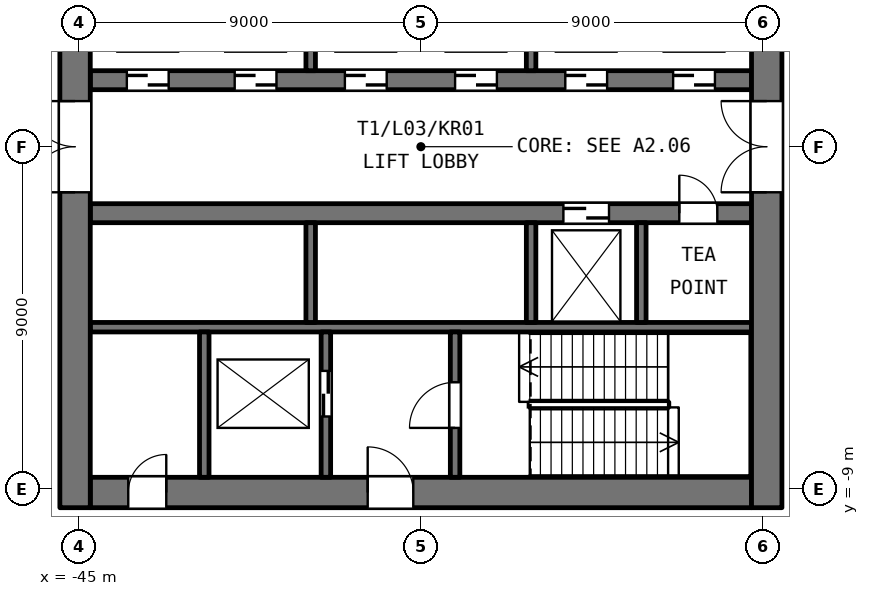
"""IFC4 building model, lengths in metres.
Left out: names, types, materials, properties, quantities, classifications, styles, units other than length and angle.
Written with IfcOpenShell. Run it as: python <this file> out.ifc"""

import sys

from ifc_helpers import new_model, si_unit, direction, frame, frame_2d, origin, place, context, subcontext, project, spatial, rectangle, extrude, element, fill, save


model = new_model("IFC4")
c1 = context("Model", 3, precision=1e-05, world=origin(), true_north=direction((0.0, 1.0)))
c2 = subcontext(c1, "Body", "Model", "MODEL_VIEW")
j1 = project(units=[si_unit("LENGTHUNIT", "METRE"), si_unit("PLANEANGLEUNIT", "RADIAN")], contexts=[c1])
p1 = place(None, origin())
s1 = spatial("IfcSite", under=j1, at=p1, CompositionType="ELEMENT")
p2 = place(p1, origin())
s2 = spatial("IfcBuilding", under=s1, at=p2, CompositionType="ELEMENT")
p3 = place(p2, frame((0.0, 0.0, 18.0)))
s3 = spatial("IfcBuildingStorey", under=s2, at=p3, CompositionType="ELEMENT", Elevation=18.0)
p4 = place(p3, frame((-44.7, -9.1, 0.0), z_axis=(0.0, 0.0, 1.0), x_axis=(1.0, 0.0, 0.0)))
e1 = element("IfcWall", 1, at=p4, inside=s3, PredefinedType="SHEAR", context=c2, shape_type="SweptSolid", body=[
    extrude(rectangle(XDim=17.4, YDim=0.8, at=frame_2d((8.7, 0.0))), origin(), (0.0, 0.0, 1.0), 4.5),
])
p5 = place(p4, frame((7.3, 0.0, 0.0)))
e2 = element("IfcOpeningElement", 2, at=p5, cuts=e1, PredefinedType="OPENING", context=c2, shape_type="SweptSolid", body=[
    extrude(rectangle(XDim=1.2, YDim=2.1, at=frame_2d((0.6, 1.05))), frame((0.0, 0.41, 0.0), z_axis=(0.0, -1.0, 0.0), x_axis=(1.0, 0.0, 0.0)), (0.0, 0.0, 1.0), 0.82),
])
p6 = place(p4, frame((1.0, 0.0, 0.0)))
e3 = element("IfcOpeningElement", 3, at=p6, cuts=e1, PredefinedType="OPENING", context=c2, shape_type="SweptSolid", body=[
    extrude(rectangle(XDim=1.0, YDim=2.1, at=frame_2d((0.5, 1.05))), frame((0.0, 0.41, 0.0), z_axis=(0.0, -1.0, 0.0), x_axis=(1.0, 0.0, 0.0)), (0.0, 0.0, 1.0), 0.82),
])
p7 = place(p3, frame((-44.7, -4.75, 0.0), z_axis=(0.0, 0.0, 1.0), x_axis=(1.0, 0.0, 0.0)))
e4 = element("IfcWall", 4, at=p7, inside=s3, PredefinedType="SHEAR", context=c2, shape_type="SweptSolid", body=[
    extrude(rectangle(XDim=17.4, YDim=0.25, at=frame_2d((8.7, 0.0))), origin(), (0.0, 0.0, 1.0), 4.5),
])
p8 = place(p3, frame((-44.7, -1.75, 0.0), z_axis=(0.0, 0.0, 1.0), x_axis=(1.0, 0.0, 0.0)))
e5 = element("IfcWall", 5, at=p8, inside=s3, PredefinedType="SHEAR", context=c2, shape_type="SweptSolid", body=[
    extrude(rectangle(XDim=17.4, YDim=0.5, at=frame_2d((8.7, 0.0))), origin(), (0.0, 0.0, 1.0), 4.5),
])
p9 = place(p8, frame((12.45, 0.0, 0.0)))
e6 = element("IfcOpeningElement", 6, at=p9, cuts=e5, PredefinedType="OPENING", context=c2, shape_type="SweptSolid", body=[
    extrude(rectangle(XDim=1.2, YDim=2.1, at=frame_2d((0.6, 1.05))), frame((0.0, 0.26, 0.0), z_axis=(0.0, -1.0, 0.0), x_axis=(1.0, 0.0, 0.0)), (0.0, 0.0, 1.0), 0.52),
])
p10 = place(p8, frame((15.5, 0.0, 0.0)))
e7 = element("IfcOpeningElement", 7, at=p10, cuts=e5, PredefinedType="OPENING", context=c2, shape_type="SweptSolid", body=[
    extrude(rectangle(XDim=1.0, YDim=2.1, at=frame_2d((0.5, 1.05))), frame((0.0, 0.26, 0.0), z_axis=(0.0, -1.0, 0.0), x_axis=(1.0, 0.0, 0.0)), (0.0, 0.0, 1.0), 0.52),
])
p11 = place(p3, frame((-44.7, 1.75, 0.0), z_axis=(0.0, 0.0, 1.0), x_axis=(1.0, 0.0, 0.0)))
e8 = element("IfcWall", 8, at=p11, inside=s3, PredefinedType="SHEAR", context=c2, shape_type="SweptSolid", body=[
    extrude(rectangle(XDim=17.4, YDim=0.5, at=frame_2d((8.7, 0.0))), origin(), (0.0, 0.0, 1.0), 4.5),
])
p12 = place(p11, frame((0.962, 0.0, 0.0)))
e9 = element("IfcOpeningElement", 9, at=p12, cuts=e8, PredefinedType="OPENING", context=c2, shape_type="SweptSolid", body=[
    extrude(rectangle(XDim=1.1, YDim=2.1, at=frame_2d((0.55, 1.05))), frame((0.0, 0.26, 0.0), z_axis=(0.0, -1.0, 0.0), x_axis=(1.0, 0.0, 0.0)), (0.0, 0.0, 1.0), 0.52),
])
p13 = place(p11, frame((3.8, 0.0, 0.0)))
e10 = element("IfcOpeningElement", 10, at=p13, cuts=e8, PredefinedType="OPENING", context=c2, shape_type="SweptSolid", body=[
    extrude(rectangle(XDim=1.1, YDim=2.1, at=frame_2d((0.55, 1.05))), frame((0.0, 0.26, 0.0), z_axis=(0.0, -1.0, 0.0), x_axis=(1.0, 0.0, 0.0)), (0.0, 0.0, 1.0), 0.52),
])
p14 = place(p11, frame((6.7, 0.0, 0.0)))
e11 = element("IfcOpeningElement", 11, at=p14, cuts=e8, PredefinedType="OPENING", context=c2, shape_type="SweptSolid", body=[
    extrude(rectangle(XDim=1.1, YDim=2.1, at=frame_2d((0.55, 1.05))), frame((0.0, 0.26, 0.0), z_axis=(0.0, -1.0, 0.0), x_axis=(1.0, 0.0, 0.0)), (0.0, 0.0, 1.0), 0.52),
])
p15 = place(p11, frame((9.6, 0.0, 0.0)))
e12 = element("IfcOpeningElement", 12, at=p15, cuts=e8, PredefinedType="OPENING", context=c2, shape_type="SweptSolid", body=[
    extrude(rectangle(XDim=1.1, YDim=2.1, at=frame_2d((0.55, 1.05))), frame((0.0, 0.26, 0.0), z_axis=(0.0, -1.0, 0.0), x_axis=(1.0, 0.0, 0.0)), (0.0, 0.0, 1.0), 0.52),
])
p16 = place(p11, frame((12.5, 0.0, 0.0)))
e13 = element("IfcOpeningElement", 13, at=p16, cuts=e8, PredefinedType="OPENING", context=c2, shape_type="SweptSolid", body=[
    extrude(rectangle(XDim=1.1, YDim=2.1, at=frame_2d((0.55, 1.05))), frame((0.0, 0.26, 0.0), z_axis=(0.0, -1.0, 0.0), x_axis=(1.0, 0.0, 0.0)), (0.0, 0.0, 1.0), 0.52),
])
p17 = place(p11, frame((15.337, 0.0, 0.0)))
e14 = element("IfcOpeningElement", 14, at=p17, cuts=e8, PredefinedType="OPENING", context=c2, shape_type="SweptSolid", body=[
    extrude(rectangle(XDim=1.1, YDim=2.1, at=frame_2d((0.55, 1.05))), frame((0.0, 0.26, 0.0), z_axis=(0.0, -1.0, 0.0), x_axis=(1.0, 0.0, 0.0)), (0.0, 0.0, 1.0), 0.52),
])
p18 = place(p3, frame((-45.1, -9.5, 0.0), z_axis=(0.0, 0.0, 1.0), x_axis=(0.0, 1.0, 0.0)))
e15 = element("IfcWall", 15, at=p18, inside=s3, PredefinedType="SHEAR", context=c2, shape_type="SweptSolid", body=[
    extrude(rectangle(XDim=19.0, YDim=0.8, at=frame_2d((9.5, 0.0))), origin(), (0.0, 0.0, 1.0), 4.5),
])
p19 = place(p18, frame((8.3, 0.0, 0.0)))
e16 = element("IfcOpeningElement", 16, at=p19, cuts=e15, PredefinedType="OPENING", context=c2, shape_type="SweptSolid", body=[
    extrude(rectangle(XDim=2.4, YDim=2.1, at=frame_2d((1.2, 1.05))), frame((0.0, 0.41, 0.0), z_axis=(0.0, -1.0, 0.0), x_axis=(1.0, 0.0, 0.0)), (0.0, 0.0, 1.0), 0.82),
])
p20 = place(p3, frame((-41.7, -8.7, 0.0), z_axis=(0.0, 0.0, 1.0), x_axis=(0.0, 1.0, 0.0)))
e17 = element("IfcWall", 17, at=p20, inside=s3, PredefinedType="SHEAR", context=c2, shape_type="SweptSolid", body=[
    extrude(rectangle(XDim=3.825, YDim=0.25, at=frame_2d((1.913, 0.0))), origin(), (0.0, 0.0, 1.0), 4.5),
])
for number, where, z_axis, x_axis in (
    (18, (-38.9, -4.625, 0.0), (0.0, 0.0, 1.0), (0.0, 1.0, 0.0)),
    (19, (-38.9, 2.0, 0.0), (0.0, 0.0, 1.0), (0.0, 1.0, 0.0)),
):
    element("IfcWall", number, at=place(p3, frame(where, z_axis=z_axis, x_axis=x_axis)), inside=s3, PredefinedType="SHEAR", context=c2, shape_type="SweptSolid", body=[
        extrude(rectangle(XDim=2.625, YDim=0.25, at=frame_2d((1.312, 0.0))), origin(), (0.0, 0.0, 1.0), 4.5),
    ])
p21 = place(p3, frame((-38.5, -8.7, 0.0), z_axis=(0.0, 0.0, 1.0), x_axis=(0.0, 1.0, 0.0)))
e20 = element("IfcWall", 20, at=p21, inside=s3, PredefinedType="SHEAR", context=c2, shape_type="SweptSolid", body=[
    extrude(rectangle(XDim=3.825, YDim=0.25, at=frame_2d((1.913, 0.0))), origin(), (0.0, 0.0, 1.0), 4.5),
])
p22 = place(p21, frame((1.6, 0.0, 0.0)))
e21 = element("IfcOpeningElement", 21, at=p22, cuts=e20, PredefinedType="OPENING", context=c2, shape_type="SweptSolid", body=[
    extrude(rectangle(XDim=1.2, YDim=2.1, at=frame_2d((0.6, 1.05))), frame((0.0, 0.135, 0.0), z_axis=(0.0, -1.0, 0.0), x_axis=(1.0, 0.0, 0.0)), (0.0, 0.0, 1.0), 0.27),
])
p23 = place(p3, frame((-35.1, -8.7, 0.0), z_axis=(0.0, 0.0, 1.0), x_axis=(0.0, 1.0, 0.0)))
e22 = element("IfcWall", 22, at=p23, inside=s3, PredefinedType="SHEAR", context=c2, shape_type="SweptSolid", body=[
    extrude(rectangle(XDim=3.825, YDim=0.25, at=frame_2d((1.913, 0.0))), origin(), (0.0, 0.0, 1.0), 4.5),
])
p24 = place(p23, frame((1.3, 0.0, 0.0)))
e23 = element("IfcOpeningElement", 23, at=p24, cuts=e22, PredefinedType="OPENING", context=c2, shape_type="SweptSolid", body=[
    extrude(rectangle(XDim=1.2, YDim=2.1, at=frame_2d((0.6, 1.05))), frame((0.0, 0.135, 0.0), z_axis=(0.0, -1.0, 0.0), x_axis=(1.0, 0.0, 0.0)), (0.0, 0.0, 1.0), 0.27),
])
for number, where, z_axis, x_axis in (
    (24, (-33.1, -4.625, 0.0), (0.0, 0.0, 1.0), (0.0, 1.0, 0.0)),
    (25, (-33.1, 2.0, 0.0), (0.0, 0.0, 1.0), (0.0, 1.0, 0.0)),
    (26, (-30.2, -4.625, 0.0), (0.0, 0.0, 1.0), (0.0, 1.0, 0.0)),
):
    element("IfcWall", number, at=place(p3, frame(where, z_axis=z_axis, x_axis=x_axis)), inside=s3, PredefinedType="SHEAR", context=c2, shape_type="SweptSolid", body=[
        extrude(rectangle(XDim=2.625, YDim=0.25, at=frame_2d((1.312, 0.0))), origin(), (0.0, 0.0, 1.0), 4.5),
    ])
p25 = place(p3, frame((-26.9, -9.5, 0.0), z_axis=(0.0, 0.0, 1.0), x_axis=(0.0, 1.0, 0.0)))
e27 = element("IfcWall", 27, at=p25, inside=s3, PredefinedType="SHEAR", context=c2, shape_type="SweptSolid", body=[
    extrude(rectangle(XDim=19.0, YDim=0.8, at=frame_2d((9.5, 0.0))), origin(), (0.0, 0.0, 1.0), 4.5),
])
p26 = place(p25, frame((8.3, 0.0, 0.0)))
e28 = element("IfcOpeningElement", 28, at=p26, cuts=e27, PredefinedType="OPENING", context=c2, shape_type="SweptSolid", body=[
    extrude(rectangle(XDim=2.4, YDim=2.1, at=frame_2d((1.2, 1.05))), frame((0.0, 0.41, 0.0), z_axis=(0.0, -1.0, 0.0), x_axis=(1.0, 0.0, 0.0)), (0.0, 0.0, 1.0), 0.82),
])
p27 = place(p19, origin())
e29 = element("IfcDoor", 29, at=p27, inside=s3, OperationType="DOUBLE_DOOR_SINGLE_SWING", PredefinedType="DOOR", context=c2, shape_type="SweptSolid", body=[
    extrude(rectangle(XDim=2.4, YDim=2.1, at=frame_2d((1.2, 1.05))), frame((0.0, -0.225, 0.0), z_axis=(0.0, -1.0, 0.0), x_axis=(1.0, 0.0, 0.0)), (0.0, 0.0, 1.0), 0.05),
])
fill(e16, e29)
p28 = place(p26, origin())
e30 = element("IfcDoor", 30, at=p28, inside=s3, OperationType="DOUBLE_DOOR_SINGLE_SWING", PredefinedType="DOOR", context=c2, shape_type="SweptSolid", body=[
    extrude(rectangle(XDim=2.4, YDim=2.1, at=frame_2d((1.2, 1.05))), frame((0.0, 0.275, 0.0), z_axis=(0.0, -1.0, 0.0), x_axis=(1.0, 0.0, 0.0)), (0.0, 0.0, 1.0), 0.05),
])
fill(e28, e30)
p29 = place(p12, origin())
e31 = element("IfcDoor", 31, at=p29, inside=s3, OperationType="SLIDING_TO_LEFT", PredefinedType="DOOR", context=c2, shape_type="SweptSolid", body=[
    extrude(rectangle(XDim=1.1, YDim=2.1, at=frame_2d((0.55, 1.05))), frame((0.0, 0.025, 0.0), z_axis=(0.0, -1.0, 0.0), x_axis=(1.0, 0.0, 0.0)), (0.0, 0.0, 1.0), 0.05),
])
fill(e9, e31)
p30 = place(p13, origin())
e32 = element("IfcDoor", 32, at=p30, inside=s3, OperationType="SLIDING_TO_LEFT", PredefinedType="DOOR", context=c2, shape_type="SweptSolid", body=[
    extrude(rectangle(XDim=1.1, YDim=2.1, at=frame_2d((0.55, 1.05))), frame((0.0, 0.025, 0.0), z_axis=(0.0, -1.0, 0.0), x_axis=(1.0, 0.0, 0.0)), (0.0, 0.0, 1.0), 0.05),
])
fill(e10, e32)
p31 = place(p14, origin())
e33 = element("IfcDoor", 33, at=p31, inside=s3, OperationType="SLIDING_TO_LEFT", PredefinedType="DOOR", context=c2, shape_type="SweptSolid", body=[
    extrude(rectangle(XDim=1.1, YDim=2.1, at=frame_2d((0.55, 1.05))), frame((0.0, 0.025, 0.0), z_axis=(0.0, -1.0, 0.0), x_axis=(1.0, 0.0, 0.0)), (0.0, 0.0, 1.0), 0.05),
])
fill(e11, e33)
p32 = place(p15, origin())
e34 = element("IfcDoor", 34, at=p32, inside=s3, OperationType="SLIDING_TO_LEFT", PredefinedType="DOOR", context=c2, shape_type="SweptSolid", body=[
    extrude(rectangle(XDim=1.1, YDim=2.1, at=frame_2d((0.55, 1.05))), frame((0.0, 0.025, 0.0), z_axis=(0.0, -1.0, 0.0), x_axis=(1.0, 0.0, 0.0)), (0.0, 0.0, 1.0), 0.05),
])
fill(e12, e34)
p33 = place(p16, origin())
e35 = element("IfcDoor", 35, at=p33, inside=s3, OperationType="SLIDING_TO_LEFT", PredefinedType="DOOR", context=c2, shape_type="SweptSolid", body=[
    extrude(rectangle(XDim=1.1, YDim=2.1, at=frame_2d((0.55, 1.05))), frame((0.0, 0.025, 0.0), z_axis=(0.0, -1.0, 0.0), x_axis=(1.0, 0.0, 0.0)), (0.0, 0.0, 1.0), 0.05),
])
fill(e13, e35)
p34 = place(p17, origin())
e36 = element("IfcDoor", 36, at=p34, inside=s3, OperationType="SLIDING_TO_LEFT", PredefinedType="DOOR", context=c2, shape_type="SweptSolid", body=[
    extrude(rectangle(XDim=1.1, YDim=2.1, at=frame_2d((0.55, 1.05))), frame((0.0, 0.025, 0.0), z_axis=(0.0, -1.0, 0.0), x_axis=(1.0, 0.0, 0.0)), (0.0, 0.0, 1.0), 0.05),
])
fill(e14, e36)
p35 = place(p9, origin())
e37 = element("IfcDoor", 37, at=p35, inside=s3, OperationType="SLIDING_TO_LEFT", PredefinedType="DOOR", context=c2, shape_type="SweptSolid", body=[
    extrude(rectangle(XDim=1.2, YDim=2.1, at=frame_2d((0.6, 1.05))), frame((0.0, 0.025, 0.0), z_axis=(0.0, -1.0, 0.0), x_axis=(1.0, 0.0, 0.0)), (0.0, 0.0, 1.0), 0.05),
])
fill(e6, e37)
p36 = place(p22, origin())
e38 = element("IfcDoor", 38, at=p36, inside=s3, OperationType="SLIDING_TO_LEFT", PredefinedType="DOOR", context=c2, shape_type="SweptSolid", body=[
    extrude(rectangle(XDim=1.2, YDim=2.1, at=frame_2d((0.6, 1.05))), frame((0.0, 0.025, 0.0), z_axis=(0.0, -1.0, 0.0), x_axis=(1.0, 0.0, 0.0)), (0.0, 0.0, 1.0), 0.05),
])
fill(e21, e38)
p37 = place(p10, origin())
e39 = element("IfcDoor", 39, at=p37, inside=s3, OperationType="SINGLE_SWING_LEFT", PredefinedType="DOOR", context=c2, shape_type="SweptSolid", body=[
    extrude(rectangle(XDim=1.0, YDim=2.1, at=frame_2d((0.5, 1.05))), frame((0.0, 0.025, 0.0), z_axis=(0.0, -1.0, 0.0), x_axis=(1.0, 0.0, 0.0)), (0.0, 0.0, 1.0), 0.05),
])
fill(e7, e39)
p38 = place(p24, origin())
e40 = element("IfcDoor", 40, at=p38, inside=s3, OperationType="SINGLE_SWING_LEFT", PredefinedType="DOOR", context=c2, shape_type="SweptSolid", body=[
    extrude(rectangle(XDim=1.2, YDim=2.1, at=frame_2d((0.6, 1.05))), frame((0.0, 0.025, 0.0), z_axis=(0.0, -1.0, 0.0), x_axis=(1.0, 0.0, 0.0)), (0.0, 0.0, 1.0), 0.05),
])
fill(e23, e40)
p39 = place(p5, origin())
e41 = element("IfcDoor", 41, at=p39, inside=s3, OperationType="SINGLE_SWING_LEFT", PredefinedType="DOOR", context=c2, shape_type="SweptSolid", body=[
    extrude(rectangle(XDim=1.2, YDim=2.1, at=frame_2d((0.6, 1.05))), frame((0.0, 0.275, 0.0), z_axis=(0.0, -1.0, 0.0), x_axis=(1.0, 0.0, 0.0)), (0.0, 0.0, 1.0), 0.05),
])
fill(e2, e41)
p40 = place(p6, origin())
e42 = element("IfcDoor", 42, at=p40, inside=s3, OperationType="SINGLE_SWING_RIGHT", PredefinedType="DOOR", context=c2, shape_type="SweptSolid", body=[
    extrude(rectangle(XDim=1.0, YDim=2.1, at=frame_2d((0.5, 1.05))), frame((0.0, 0.275, 0.0), z_axis=(0.0, -1.0, 0.0), x_axis=(1.0, 0.0, 0.0)), (0.0, 0.0, 1.0), 0.05),
])
fill(e3, e42)
save(model, sys.argv[1])
